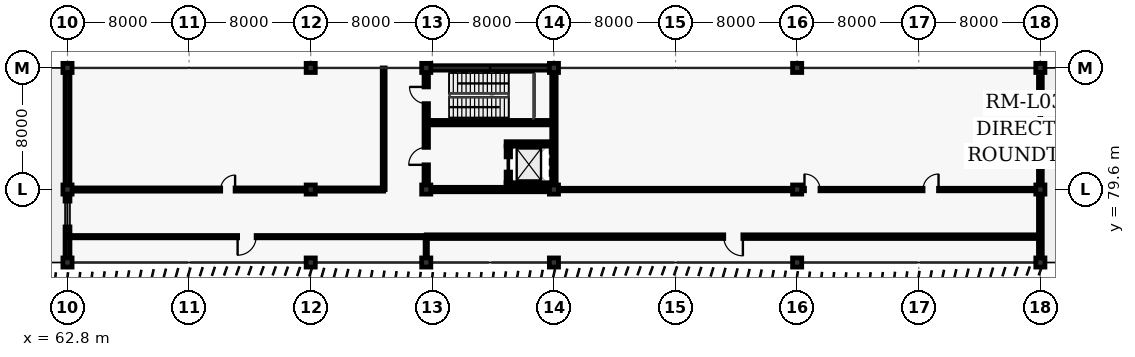
"""IFC4 building model, lengths in metres.
Left out: names, types, materials, properties, quantities, classifications, styles, units other than length and angle.
Written with IfcOpenShell. Run it as: python <this file> out.ifc"""

import sys

from ifc_helpers import new_model, si_unit, direction, frame, frame_2d, origin, origin_2d, place, context, subcontext, project, spatial, rectangle, extrude, element, fill, save


model = new_model("IFC4")
c1 = context("Model", 3, precision=1e-05, world=origin(), true_north=direction((0.0, 1.0)))
c2 = subcontext(c1, "Body", "Model", "MODEL_VIEW")
j1 = project(units=[si_unit("LENGTHUNIT", "METRE"), si_unit("PLANEANGLEUNIT", "RADIAN")], contexts=[c1])
p1 = place(None, origin())
s1 = spatial("IfcSite", under=j1, at=p1, CompositionType="ELEMENT")
p2 = place(p1, origin())
s2 = spatial("IfcBuilding", under=s1, at=p2, CompositionType="ELEMENT")
p3 = place(p2, frame((0.0, 0.0, 15.6)))
s3 = spatial("IfcBuildingStorey", under=s2, at=p3, CompositionType="ELEMENT", Elevation=15.6)
for number, where, z_axis, x_axis in (
    (1, (62.8, 74.8, 0.0), (0.0, 0.0, 1.0), (1.0, 0.0, 0.0)),
    (2, (62.8, 79.6, 0.0), (0.0, 0.0, 1.0), (1.0, 0.0, 0.0)),
    (3, (62.8, 87.6, 0.0), (0.0, 0.0, 1.0), (1.0, 0.0, 0.0)),
    (4, (78.8, 74.8, 0.0), (0.0, 0.0, 1.0), (1.0, 0.0, 0.0)),
    (5, (78.8, 79.6, 0.0), (0.0, 0.0, 1.0), (1.0, 0.0, 0.0)),
    (6, (78.8, 87.6, 0.0), (0.0, 0.0, 1.0), (1.0, 0.0, 0.0)),
    (7, (86.4, 74.8, 0.0), (0.0, 0.0, 1.0), (1.0, 0.0, 0.0)),
    (8, (86.4, 79.6, 0.0), (0.0, 0.0, 1.0), (1.0, 0.0, 0.0)),
    (9, (86.4, 87.6, 0.0), (0.0, 0.0, 1.0), (1.0, 0.0, 0.0)),
    (10, (94.8, 74.8, 0.0), (0.0, 0.0, 1.0), (1.0, 0.0, 0.0)),
    (11, (94.8, 79.6, 0.0), (0.0, 0.0, 1.0), (1.0, 0.0, 0.0)),
    (12, (94.8, 87.6, 0.0), (0.0, 0.0, 1.0), (1.0, 0.0, 0.0)),
    (13, (110.8, 74.8, 0.0), (0.0, 0.0, 1.0), (1.0, 0.0, 0.0)),
    (14, (110.8, 79.6, 0.0), (0.0, 0.0, 1.0), (1.0, 0.0, 0.0)),
    (15, (110.8, 87.6, 0.0), (0.0, 0.0, 1.0), (1.0, 0.0, 0.0)),
    (16, (126.8, 74.8, 0.0), (0.0, 0.0, 1.0), (1.0, 0.0, 0.0)),
    (17, (126.8, 79.6, 0.0), (0.0, 0.0, 1.0), (1.0, 0.0, 0.0)),
    (18, (126.8, 87.6, 0.0), (0.0, 0.0, 1.0), (1.0, 0.0, 0.0)),
):
    element("IfcColumn", number, at=place(p3, frame(where, z_axis=z_axis, x_axis=x_axis)), inside=s3, PredefinedType="COLUMN", context=c2, shape_type="SweptSolid", body=[
        extrude(rectangle(XDim=0.6, YDim=0.6, at=origin_2d()), origin(), (0.0, 0.0, 1.0), 4.8),
    ])
p4 = place(p3, frame((126.8, 87.46, 0.0), z_axis=(0.0, 0.0, 1.0), x_axis=(0.0, -1.0, 0.0)))
e19 = element("IfcWall", 19, at=p4, inside=s3, PredefinedType="SOLIDWALL", context=c2, shape_type="SweptSolid", body=[
    extrude(rectangle(XDim=12.52, YDim=0.25, at=frame_2d((6.26, 0.0))), origin(), (0.0, 0.0, 1.0), 3.73),
])
p5 = place(p4, frame((2.2, 0.0, 0.8)))
e20 = element("IfcOpeningElement", 20, at=p5, cuts=e19, PredefinedType="OPENING", context=c2, shape_type="SweptSolid", body=[
    extrude(rectangle(XDim=1.6, YDim=2.1, at=frame_2d((0.8, 1.05))), frame((0.0, 0.135, 0.0), z_axis=(0.0, -1.0, 0.0), x_axis=(1.0, 0.0, 0.0)), (0.0, 0.0, 1.0), 0.27),
])
p6 = place(p3, frame((62.8, 74.94, 0.0), z_axis=(0.0, 0.0, 1.0), x_axis=(0.0, 1.0, 0.0)))
e21 = element("IfcWall", 21, at=p6, inside=s3, PredefinedType="SOLIDWALL", context=c2, shape_type="SweptSolid", body=[
    extrude(rectangle(XDim=12.52, YDim=0.32, at=frame_2d((6.26, 0.0))), origin(), (0.0, 0.0, 1.0), 3.73),
])
p7 = place(p6, frame((2.2, 0.0, 0.8)))
e22 = element("IfcOpeningElement", 22, at=p7, cuts=e21, PredefinedType="OPENING", context=c2, shape_type="SweptSolid", body=[
    extrude(rectangle(XDim=1.7, YDim=2.15, at=frame_2d((0.85, 1.075))), frame((0.0, 0.17, 0.0), z_axis=(0.0, -1.0, 0.0), x_axis=(1.0, 0.0, 0.0)), (0.0, 0.0, 1.0), 0.34),
])
for number, where, z_axis, x_axis in (
    (23, (86.702, 79.6, 0.0), (0.0, 0.0, 1.0), (1.0, 0.0, 0.0)),
    (24, (86.702, 87.6, 0.0), (0.0, 0.0, 1.0), (1.0, 0.0, 0.0)),
):
    element("IfcWall", number, at=place(p3, frame(where, z_axis=z_axis, x_axis=x_axis)), inside=s3, PredefinedType="SHEAR", context=c2, shape_type="SweptSolid", body=[
        extrude(rectangle(XDim=7.796, YDim=0.29, at=frame_2d((3.898, 0.0))), origin(), (0.0, 0.0, 1.0), 4.58),
    ])
p8 = place(p3, frame((86.4, 79.902, 0.0), z_axis=(0.0, 0.0, 1.0), x_axis=(0.0, 1.0, 0.0)))
e25 = element("IfcWall", 25, at=p8, inside=s3, PredefinedType="SHEAR", context=c2, shape_type="SweptSolid", body=[
    extrude(rectangle(XDim=7.396, YDim=0.29, at=frame_2d((3.698, 0.0))), origin(), (0.0, 0.0, 1.0), 4.58),
])
p9 = place(p8, frame((5.348, 0.0, 0.0)))
e26 = element("IfcOpeningElement", 26, at=p9, cuts=e25, PredefinedType="OPENING", context=c2, shape_type="SweptSolid", body=[
    extrude(rectangle(XDim=1.1, YDim=2.15, at=frame_2d((0.55, 1.075))), frame((0.0, 0.155, 0.0), z_axis=(0.0, -1.0, 0.0), x_axis=(1.0, 0.0, 0.0)), (0.0, 0.0, 1.0), 0.31),
])
p10 = place(p8, frame((1.323, 0.0, 0.0)))
e27 = element("IfcOpeningElement", 27, at=p10, cuts=e25, PredefinedType="OPENING", context=c2, shape_type="SweptSolid", body=[
    extrude(rectangle(XDim=1.15, YDim=2.2, at=frame_2d((0.575, 1.1))), frame((0.0, 0.155, 0.0), z_axis=(0.0, -1.0, 0.0), x_axis=(1.0, 0.0, 0.0)), (0.0, 0.0, 1.0), 0.31),
])
p11 = place(p3, frame((94.8, 79.902, 0.0), z_axis=(0.0, 0.0, 1.0), x_axis=(0.0, 1.0, 0.0)))
e28 = element("IfcWall", 28, at=p11, inside=s3, PredefinedType="SHEAR", context=c2, shape_type="SweptSolid", body=[
    extrude(rectangle(XDim=7.396, YDim=0.29, at=frame_2d((3.698, 0.0))), origin(), (0.0, 0.0, 1.0), 4.58),
])
p12 = place(p3, frame((86.545, 84.0, 0.0), z_axis=(0.0, 0.0, 1.0), x_axis=(1.0, 0.0, 0.0)))
e29 = element("IfcWall", 29, at=p12, inside=s3, PredefinedType="SHEAR", context=c2, shape_type="SweptSolid", body=[
    extrude(rectangle(XDim=8.11, YDim=0.29, at=frame_2d((4.055, 0.0))), origin(), (0.0, 0.0, 1.0), 4.58),
])
p13 = place(p3, frame((91.655, 79.9, 0.0), z_axis=(0.0, 0.0, 1.0), x_axis=(1.0, 0.0, 0.0)))
e30 = element("IfcWall", 30, at=p13, inside=s3, PredefinedType="SHEAR", context=c2, shape_type="SweptSolid", body=[
    extrude(rectangle(XDim=2.843, YDim=0.29, at=frame_2d((1.421, 0.0))), origin(), (0.0, 0.0, 1.0), 4.58),
])
p14 = place(p3, frame((91.655, 82.6, 0.0), z_axis=(0.0, 0.0, 1.0), x_axis=(1.0, 0.0, 0.0)))
e31 = element("IfcWall", 31, at=p14, inside=s3, PredefinedType="SHEAR", context=c2, shape_type="SweptSolid", body=[
    extrude(rectangle(XDim=2.99, YDim=0.29, at=frame_2d((1.495, 0.0))), origin(), (0.0, 0.0, 1.0), 4.58),
])
p15 = place(p3, frame((91.8, 80.045, 0.0), z_axis=(0.0, 0.0, 1.0), x_axis=(0.0, 1.0, 0.0)))
e32 = element("IfcWall", 32, at=p15, inside=s3, PredefinedType="SHEAR", context=c2, shape_type="SweptSolid", body=[
    extrude(rectangle(XDim=2.41, YDim=0.29, at=frame_2d((1.205, 0.0))), origin(), (0.0, 0.0, 1.0), 4.58),
])
p16 = place(p15, frame((0.705, 0.0, 0.0)))
e33 = element("IfcOpeningElement", 33, at=p16, cuts=e32, PredefinedType="OPENING", context=c2, shape_type="SweptSolid", body=[
    extrude(rectangle(XDim=1.0, YDim=2.15, at=frame_2d((0.5, 1.075))), frame((0.0, 0.155, 0.0), z_axis=(0.0, -1.0, 0.0), x_axis=(1.0, 0.0, 0.0)), (0.0, 0.0, 1.0), 0.31),
])
p17 = place(p3, frame((86.4, 76.5, 0.0), z_axis=(0.0, 0.0, 1.0), x_axis=(-1.0, 0.0, 0.0)))
e34 = element("IfcWall", 34, at=p17, inside=s3, PredefinedType="PARTITIONING", context=c2, shape_type="SweptSolid", body=[
    extrude(rectangle(XDim=23.6, YDim=0.15, at=frame_2d((11.8, 0.0))), origin(), (0.0, 0.0, 1.0), 4.58),
])
p18 = place(p17, frame((11.19, 0.0, 0.0)))
e35 = element("IfcOpeningElement", 35, at=p18, cuts=e34, PredefinedType="OPENING", context=c2, shape_type="SweptSolid", body=[
    extrude(rectangle(XDim=1.22, YDim=2.2, at=frame_2d((0.61, 1.1))), frame((0.0, 0.085, 0.0), z_axis=(0.0, -1.0, 0.0), x_axis=(1.0, 0.0, 0.0)), (0.0, 0.0, 1.0), 0.17),
])
p19 = place(p3, frame((126.8, 76.5, 0.0), z_axis=(0.0, 0.0, 1.0), x_axis=(-1.0, 0.0, 0.0)))
e36 = element("IfcWall", 36, at=p19, inside=s3, PredefinedType="PARTITIONING", context=c2, shape_type="SweptSolid", body=[
    extrude(rectangle(XDim=40.4, YDim=0.24, at=frame_2d((20.2, 0.0))), origin(), (0.0, 0.0, 1.0), 4.58),
])
p20 = place(p19, frame((19.57, 0.0, 0.0)))
e37 = element("IfcOpeningElement", 37, at=p20, cuts=e36, PredefinedType="OPENING", context=c2, shape_type="SweptSolid", body=[
    extrude(rectangle(XDim=1.26, YDim=2.2, at=frame_2d((0.63, 1.1))), frame((0.0, 0.13, 0.0), z_axis=(0.0, -1.0, 0.0), x_axis=(1.0, 0.0, 0.0)), (0.0, 0.0, 1.0), 0.26),
])
p21 = place(p3, frame((63.102, 79.6, 0.0), z_axis=(0.0, 0.0, 1.0), x_axis=(1.0, 0.0, 0.0)))
e38 = element("IfcWall", 38, at=p21, inside=s3, PredefinedType="PARTITIONING", context=c2, shape_type="SweptSolid", body=[
    extrude(rectangle(XDim=20.498, YDim=0.21, at=frame_2d((10.249, 0.0))), origin(), (0.0, 0.0, 1.0), 3.73),
])
p22 = place(p21, frame((9.774, 0.0, 0.0)))
e39 = element("IfcOpeningElement", 39, at=p22, cuts=e38, PredefinedType="OPENING", context=c2, shape_type="SweptSolid", body=[
    extrude(rectangle(XDim=0.95, YDim=2.1, at=frame_2d((0.475, 1.05))), frame((0.0, 0.115, 0.0), z_axis=(0.0, -1.0, 0.0), x_axis=(1.0, 0.0, 0.0)), (0.0, 0.0, 1.0), 0.23),
])
p23 = place(p3, frame((83.6, 79.6, 0.0), z_axis=(0.0, 0.0, 1.0), x_axis=(0.0, 1.0, 0.0)))
e40 = element("IfcWall", 40, at=p23, inside=s3, PredefinedType="PARTITIONING", context=c2, shape_type="SweptSolid", body=[
    extrude(rectangle(XDim=8.0, YDim=0.19, at=frame_2d((4.0, 0.0))), origin(), (0.0, 0.0, 1.0), 4.58),
])
p24 = place(p3, frame((95.102, 79.6, 0.0), z_axis=(0.0, 0.0, 1.0), x_axis=(1.0, 0.0, 0.0)))
e41 = element("IfcWall", 41, at=p24, inside=s3, PredefinedType="PARTITIONING", context=c2, shape_type="SweptSolid", body=[
    extrude(rectangle(XDim=31.396, YDim=0.165, at=frame_2d((15.698, 0.0))), origin(), (0.0, 0.0, 1.0), 3.73),
])
p25 = place(p24, frame((16.18, 0.0, 0.0)))
e42 = element("IfcOpeningElement", 42, at=p25, cuts=e41, PredefinedType="OPENING", context=c2, shape_type="SweptSolid", body=[
    extrude(rectangle(XDim=1.02, YDim=2.1, at=frame_2d((0.51, 1.05))), frame((0.0, 0.093, 0.0), z_axis=(0.0, -1.0, 0.0), x_axis=(1.0, 0.0, 0.0)), (0.0, 0.0, 1.0), 0.185),
])
p26 = place(p24, frame((23.979, 0.0, 0.0)))
e43 = element("IfcOpeningElement", 43, at=p26, cuts=e41, PredefinedType="OPENING", context=c2, shape_type="SweptSolid", body=[
    extrude(rectangle(XDim=1.02, YDim=2.1, at=frame_2d((0.51, 1.05))), frame((0.0, 0.093, 0.0), z_axis=(0.0, -1.0, 0.0), x_axis=(1.0, 0.0, 0.0)), (0.0, 0.0, 1.0), 0.185),
])
p27 = place(p3, frame((86.4, 76.5, 0.0), z_axis=(0.0, 0.0, 1.0), x_axis=(0.0, -1.0, 0.0)))
e44 = element("IfcWall", 44, at=p27, inside=s3, PredefinedType="PARTITIONING", context=c2, shape_type="SweptSolid", body=[
    extrude(rectangle(XDim=1.398, YDim=0.15, at=frame_2d((0.699, 0.0))), origin(), (0.0, 0.0, 1.0), 3.83),
])
p28 = place(p5, origin())
e45 = element("IfcWindow", 45, at=p28, inside=s3, PartitioningType="SINGLE_PANEL", PredefinedType="WINDOW", context=c2, shape_type="SweptSolid", body=[
    extrude(rectangle(XDim=1.6, YDim=2.1, at=frame_2d((0.8, 1.05))), frame((0.0, 0.03, 0.0), z_axis=(0.0, -1.0, 0.0), x_axis=(1.0, 0.0, 0.0)), (0.0, 0.0, 1.0), 0.06),
])
fill(e20, e45)
p29 = place(p7, origin())
e46 = element("IfcWindow", 46, at=p29, inside=s3, PartitioningType="SINGLE_PANEL", PredefinedType="WINDOW", context=c2, shape_type="SweptSolid", body=[
    extrude(rectangle(XDim=1.7, YDim=2.15, at=frame_2d((0.85, 1.075))), frame((0.0, 0.03, 0.0), z_axis=(0.0, -1.0, 0.0), x_axis=(1.0, 0.0, 0.0)), (0.0, 0.0, 1.0), 0.06),
])
fill(e22, e46)
p30 = place(p9, origin())
e47 = element("IfcDoor", 47, at=p30, inside=s3, OperationType="SINGLE_SWING_RIGHT", PredefinedType="DOOR", context=c2, shape_type="SweptSolid", body=[
    extrude(rectangle(XDim=1.1, YDim=2.15, at=frame_2d((0.55, 1.075))), frame((0.0, 0.025, 0.0), z_axis=(0.0, -1.0, 0.0), x_axis=(1.0, 0.0, 0.0)), (0.0, 0.0, 1.0), 0.05),
])
fill(e26, e47)
p31 = place(p10, origin())
e48 = element("IfcDoor", 48, at=p31, inside=s3, OperationType="SINGLE_SWING_LEFT", PredefinedType="DOOR", context=c2, shape_type="SweptSolid", body=[
    extrude(rectangle(XDim=1.15, YDim=2.2, at=frame_2d((0.575, 1.1))), frame((0.0, 0.025, 0.0), z_axis=(0.0, -1.0, 0.0), x_axis=(1.0, 0.0, 0.0)), (0.0, 0.0, 1.0), 0.05),
])
fill(e27, e48)
p32 = place(p16, origin())
e49 = element("IfcDoor", 49, at=p32, inside=s3, OperationType="SLIDING_TO_LEFT", PredefinedType="DOOR", context=c2, shape_type="SweptSolid", body=[
    extrude(rectangle(XDim=1.0, YDim=2.15, at=frame_2d((0.5, 1.075))), frame((0.0, 0.025, 0.0), z_axis=(0.0, -1.0, 0.0), x_axis=(1.0, 0.0, 0.0)), (0.0, 0.0, 1.0), 0.05),
])
fill(e33, e49)
p33 = place(p18, origin())
e50 = element("IfcDoor", 50, at=p33, inside=s3, OperationType="SINGLE_SWING_RIGHT", PredefinedType="DOOR", context=c2, shape_type="SweptSolid", body=[
    extrude(rectangle(XDim=1.22, YDim=2.2, at=frame_2d((0.61, 1.1))), frame((0.0, 0.025, 0.0), z_axis=(0.0, -1.0, 0.0), x_axis=(1.0, 0.0, 0.0)), (0.0, 0.0, 1.0), 0.05),
])
fill(e35, e50)
p34 = place(p20, origin())
e51 = element("IfcDoor", 51, at=p34, inside=s3, OperationType="SINGLE_SWING_LEFT", PredefinedType="DOOR", context=c2, shape_type="SweptSolid", body=[
    extrude(rectangle(XDim=1.26, YDim=2.2, at=frame_2d((0.63, 1.1))), frame((0.0, 0.025, 0.0), z_axis=(0.0, -1.0, 0.0), x_axis=(1.0, 0.0, 0.0)), (0.0, 0.0, 1.0), 0.05),
])
fill(e37, e51)
p35 = place(p22, origin())
e52 = element("IfcDoor", 52, at=p35, inside=s3, OperationType="SINGLE_SWING_RIGHT", PredefinedType="DOOR", context=c2, shape_type="SweptSolid", body=[
    extrude(rectangle(XDim=0.95, YDim=2.1, at=frame_2d((0.475, 1.05))), frame((0.0, 0.025, 0.0), z_axis=(0.0, -1.0, 0.0), x_axis=(1.0, 0.0, 0.0)), (0.0, 0.0, 1.0), 0.05),
])
fill(e39, e52)
p36 = place(p25, origin())
e53 = element("IfcDoor", 53, at=p36, inside=s3, OperationType="SINGLE_SWING_LEFT", PredefinedType="DOOR", context=c2, shape_type="SweptSolid", body=[
    extrude(rectangle(XDim=1.02, YDim=2.1, at=frame_2d((0.51, 1.05))), frame((0.0, 0.025, 0.0), z_axis=(0.0, -1.0, 0.0), x_axis=(1.0, 0.0, 0.0)), (0.0, 0.0, 1.0), 0.05),
])
fill(e42, e53)
p37 = place(p26, origin())
e54 = element("IfcDoor", 54, at=p37, inside=s3, OperationType="SINGLE_SWING_RIGHT", PredefinedType="DOOR", context=c2, shape_type="SweptSolid", body=[
    extrude(rectangle(XDim=1.02, YDim=2.1, at=frame_2d((0.51, 1.05))), frame((0.0, 0.025, 0.0), z_axis=(0.0, -1.0, 0.0), x_axis=(1.0, 0.0, 0.0)), (0.0, 0.0, 1.0), 0.05),
])
fill(e43, e54)
save(model, sys.argv[1])
